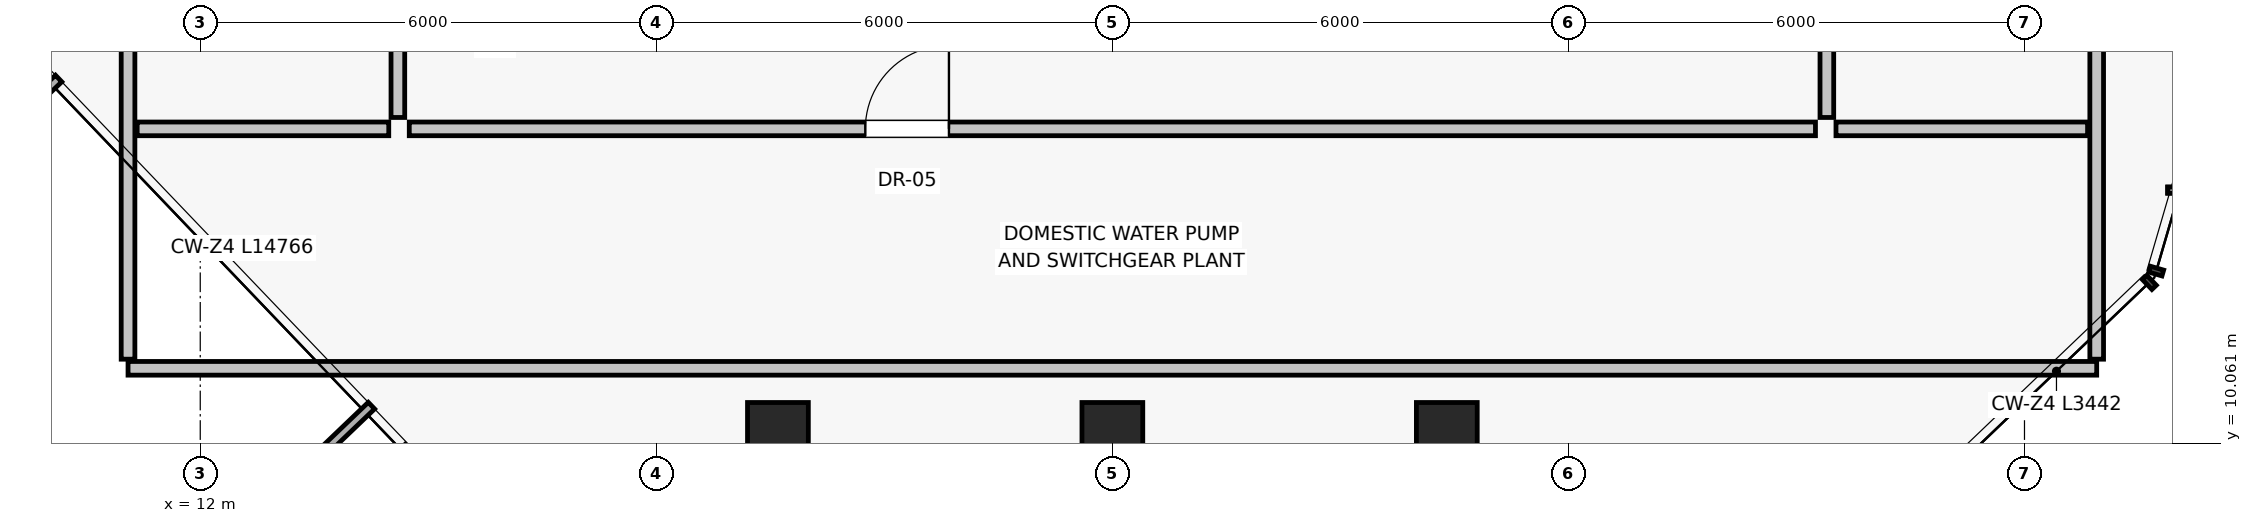
"""IFC4 building model, lengths in metres.
Left out: names, types, materials, properties, quantities, classifications, styles, units other than length and angle.
Written with IfcOpenShell. Run it as: python <this file> out.ifc"""

import sys

from ifc_helpers import new_model, si_unit, direction, frame, frame_2d, origin, origin_2d, place, context, subcontext, project, spatial, rectangle, extrude, source, transform, mapped, element, fill, save


model = new_model("IFC4")
c1 = context("Model", 3, precision=1e-05, world=origin(), true_north=direction((0.0, 1.0)))
c2 = subcontext(c1, "Body", "Model", "MODEL_VIEW")
j1 = project(units=[si_unit("LENGTHUNIT", "METRE"), si_unit("PLANEANGLEUNIT", "RADIAN")], contexts=[c1])
p1 = place(None, origin())
s1 = spatial("IfcSite", under=j1, at=p1, CompositionType="ELEMENT")
p2 = place(p1, origin())
s2 = spatial("IfcBuilding", under=s1, at=p2, CompositionType="ELEMENT")
p3 = place(p2, frame((0.0, 0.0, 264.25)))
s3 = spatial("IfcBuildingStorey", under=s2, at=p3, CompositionType="ELEMENT", Elevation=264.25)
for number, where, z_axis, x_axis in (
    (1, (19.6, 10.2, 0.0), (0.0, 0.0, 1.0), (1.0, 0.0, 0.0)),
    (2, (24.0, 10.2, 0.0), (0.0, 0.0, 1.0), (1.0, 0.0, 0.0)),
    (3, (28.4, 10.2, 0.0), (0.0, 0.0, 1.0), (1.0, 0.0, 0.0)),
):
    element("IfcColumn", number, at=place(p3, frame(where, z_axis=z_axis, x_axis=x_axis)), inside=s3, PredefinedType="COLUMN", context=c2, shape_type="SweptSolid", body=[
        extrude(rectangle(XDim=0.8, YDim=0.8, at=origin_2d()), origin(), (0.0, 0.0, 1.0), 4.65),
    ])
p4 = place(p3, frame((14.75, 14.2, 0.0), z_axis=(0.0, 0.0, 1.0), x_axis=(1.0, 0.0, 0.0)))
e4 = element("IfcWall", 4, at=p4, inside=s3, PredefinedType="PARTITIONING", context=c2, shape_type="SweptSolid", body=[
    extrude(rectangle(XDim=18.5, YDim=0.18, at=frame_2d((9.25, 0.0))), origin(), (0.0, 0.0, 1.0), 4.39),
])
p5 = place(p4, frame((6.0, 0.0, 0.0)))
e5 = element("IfcOpeningElement", 5, at=p5, cuts=e4, PredefinedType="OPENING", context=c2, shape_type="SweptSolid", body=[
    extrude(rectangle(XDim=1.1, YDim=2.03, at=frame_2d((0.55, 1.015))), frame((0.0, 0.1, 0.0), z_axis=(0.0, -1.0, 0.0), x_axis=(1.0, 0.0, 0.0)), (0.0, 0.0, 1.0), 0.2),
])
p6 = place(p3, frame((33.4, 14.35, 0.0), z_axis=(0.0, 0.0, 1.0), x_axis=(0.0, 1.0, 0.0)))
e6 = element("IfcWall", 6, at=p6, inside=s3, PredefinedType="PARTITIONING", context=c2, shape_type="SweptSolid", body=[
    extrude(rectangle(XDim=19.1, YDim=0.18, at=frame_2d((9.55, 0.0))), origin(), (0.0, 0.0, 1.0), 4.39),
])
p7 = place(p6, frame((6.0, 0.0, 0.0)))
e7 = element("IfcOpeningElement", 7, at=p7, cuts=e6, PredefinedType="OPENING", context=c2, shape_type="SweptSolid", body=[
    extrude(rectangle(XDim=1.1, YDim=2.03, at=frame_2d((0.55, 1.015))), frame((0.0, 0.1, 0.0), z_axis=(0.0, -1.0, 0.0), x_axis=(1.0, 0.0, 0.0)), (0.0, 0.0, 1.0), 0.2),
])
p8 = place(p3, frame((14.6, 14.35, 0.0), z_axis=(0.0, 0.0, 1.0), x_axis=(0.0, 1.0, 0.0)))
e8 = element("IfcWall", 8, at=p8, inside=s3, PredefinedType="PARTITIONING", context=c2, shape_type="SweptSolid", body=[
    extrude(rectangle(XDim=19.1, YDim=0.18, at=frame_2d((9.55, 0.0))), origin(), (0.0, 0.0, 1.0), 4.39),
])
p9 = place(p8, frame((6.0, 0.0, 0.0)))
e9 = element("IfcOpeningElement", 9, at=p9, cuts=e8, PredefinedType="OPENING", context=c2, shape_type="SweptSolid", body=[
    extrude(rectangle(XDim=1.1, YDim=2.03, at=frame_2d((0.55, 1.015))), frame((0.0, 0.1, 0.0), z_axis=(0.0, -1.0, 0.0), x_axis=(1.0, 0.0, 0.0)), (0.0, 0.0, 1.0), 0.2),
])
p10 = place(p3, frame((11.05, 11.05, 0.0), z_axis=(0.0, 0.0, 1.0), x_axis=(1.0, 0.0, 0.0)))
e10 = element("IfcWall", 10, at=p10, inside=s3, PredefinedType="PARTITIONING", context=c2, shape_type="SweptSolid", body=[
    extrude(rectangle(XDim=25.9, YDim=0.18, at=frame_2d((12.95, 0.0))), origin(), (0.0, 0.0, 1.0), 2.19),
])
for number, where, z_axis, x_axis in (
    (11, (11.05, 11.17, 0.0), (0.0, 0.0, 1.0), (0.0, 1.0, 0.0)),
    (12, (36.95, 11.17, 0.0), (0.0, 0.0, 1.0), (0.0, 1.0, 0.0)),
):
    element("IfcWall", number, at=place(p3, frame(where, z_axis=z_axis, x_axis=x_axis)), inside=s3, PredefinedType="PARTITIONING", context=c2, shape_type="SweptSolid", body=[
        extrude(rectangle(XDim=25.66, YDim=0.18, at=frame_2d((12.83, 0.0))), origin(), (0.0, 0.0, 1.0), 2.19),
    ])
for number, where, z_axis, x_axis in (
    (13, (11.17, 14.2, 0.0), (0.0, 0.0, 1.0), (1.0, 0.0, 0.0)),
    (14, (33.52, 14.2, 0.0), (0.0, 0.0, 1.0), (1.0, 0.0, 0.0)),
):
    element("IfcWall", number, at=place(p3, frame(where, z_axis=z_axis, x_axis=x_axis)), inside=s3, PredefinedType="PARTITIONING", context=c2, shape_type="SweptSolid", body=[
        extrude(rectangle(XDim=3.31, YDim=0.18, at=frame_2d((1.655, 0.0))), origin(), (0.0, 0.0, 1.0), 4.39),
    ])
m1 = source(origin(), c2, "Body", "SweptSolid", [
    extrude(rectangle(XDim=1.1, YDim=2.03, at=frame_2d((0.55, 1.015))), frame((0.0, 0.025, 0.0), z_axis=(0.0, -1.0, 0.0), x_axis=(1.0, 0.0, 0.0)), (0.0, 0.0, 1.0), 0.05),
])
p11 = place(p5, origin())
e15 = element("IfcDoor", 15, at=p11, inside=s3, OperationType="SINGLE_SWING_RIGHT", PredefinedType="DOOR", context=c2, shape_type="MappedRepresentation", body=[
    mapped(m1, transform((0.0, 0.0, 0.0), scale=1.0)),
])
fill(e5, e15)
save(model, sys.argv[1])
